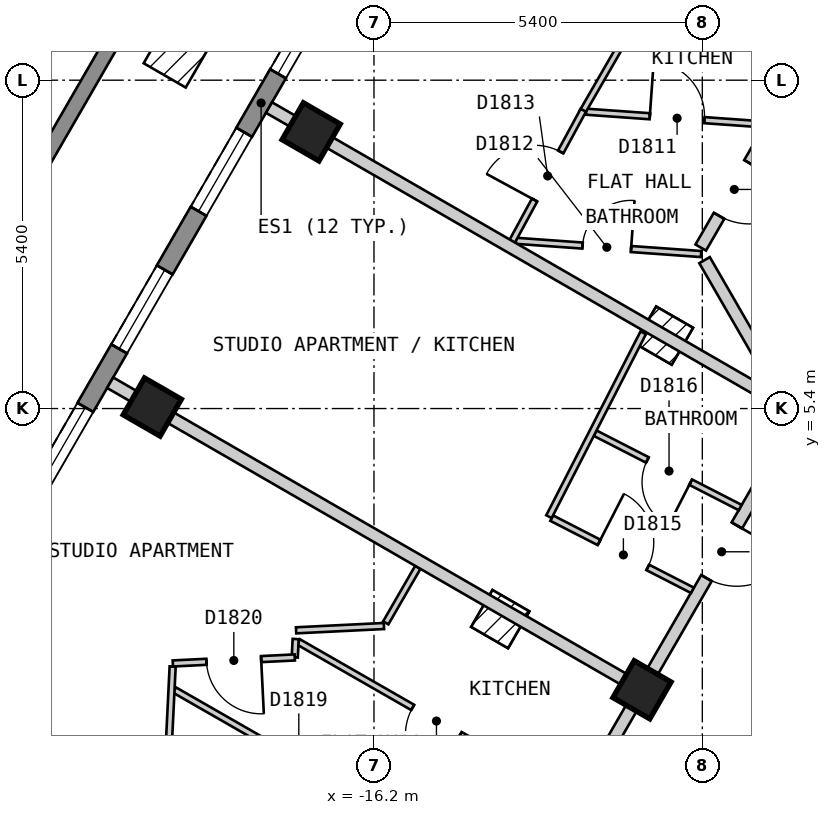
"""IFC4 building model, lengths in metres.
Left out: names, types, materials, properties, quantities, classifications, styles, units other than length and angle.
Written with IfcOpenShell. Run it as: python <this file> out.ifc"""

import sys

from ifc_helpers import new_model, si_unit, direction, frame, frame_2d, origin, origin_2d, place, context, subcontext, project, spatial, polyline, rectangle, outline, extrude, element, fill, save


model = new_model("IFC4")
c1 = context("Model", 3, precision=1e-05, world=origin(), true_north=direction((0.0, 1.0)))
c2 = subcontext(c1, "Body", "Model", "MODEL_VIEW")
j1 = project(units=[si_unit("LENGTHUNIT", "METRE"), si_unit("PLANEANGLEUNIT", "RADIAN")], contexts=[c1])
p1 = place(None, origin())
s1 = spatial("IfcSite", under=j1, at=p1, CompositionType="ELEMENT")
p2 = place(p1, origin())
s2 = spatial("IfcBuilding", under=s1, at=p2, CompositionType="ELEMENT")
p3 = place(p2, frame((0.0, 0.0, 202.8)))
s3 = spatial("IfcBuildingStorey", under=s2, at=p3, CompositionType="ELEMENT", Elevation=202.8)
for number, where, z_axis, x_axis in (
    (1, (-17.233, 9.95, 0.0), (0.0, 0.0, 1.0), (-0.5, -0.866, 0.0)),
    (2, (-19.846, 5.425, 0.0), (0.0, 0.0, 1.0), (-0.5, -0.866, 0.0)),
    (3, (-11.792, 0.775, 0.0), (0.0, 0.0, 1.0), (-0.5, -0.866, 0.0)),
):
    element("IfcColumn", number, at=place(p3, frame(where, z_axis=z_axis, x_axis=x_axis)), inside=s3, PredefinedType="COLUMN", context=c2, shape_type="SweptSolid", body=[
        extrude(rectangle(XDim=0.7, YDim=0.7, at=origin_2d()), origin(), (0.0, 0.0, 1.0), 3.0),
    ])
p4 = place(p3, frame((-12.514, 20.025, 0.0), z_axis=(0.0, 0.0, 1.0), x_axis=(-0.500003656944, -0.866023292436, 0.0)))
e4 = element("IfcWall", 4, at=p4, inside=s3, PredefinedType="SOLIDWALL", context=c2, shape_type="SweptSolid", body=[
    extrude(outline(polyline([(0.0, -0.15), (22.17, -0.15), (22.09, 0.15), (0.08, 0.15), (0.0, -0.15)])), origin(), (0.0, 0.0, 1.0), 2.7),
])
p5 = place(p4, frame((1.191, 0.0, 0.15)))
e5 = element("IfcOpeningElement", 5, at=p5, cuts=e4, PredefinedType="OPENING", context=c2, shape_type="SweptSolid", body=[
    extrude(rectangle(XDim=1.5, YDim=2.1, at=frame_2d((0.75, 1.05))), frame((0.0, 0.16, 0.0), z_axis=(0.0, -1.0, 0.0), x_axis=(1.0, 0.0, 0.0)), (0.0, 0.0, 1.0), 0.32),
])
p6 = place(p4, frame((3.804, 0.0, 0.15)))
e6 = element("IfcOpeningElement", 6, at=p6, cuts=e4, PredefinedType="OPENING", context=c2, shape_type="SweptSolid", body=[
    extrude(rectangle(XDim=1.5, YDim=2.1, at=frame_2d((0.75, 1.05))), frame((0.0, 0.16, 0.0), z_axis=(0.0, -1.0, 0.0), x_axis=(1.0, 0.0, 0.0)), (0.0, 0.0, 1.0), 0.32),
])
p7 = place(p4, frame((6.416, 0.0, 0.15)))
e7 = element("IfcOpeningElement", 7, at=p7, cuts=e4, PredefinedType="OPENING", context=c2, shape_type="SweptSolid", body=[
    extrude(rectangle(XDim=1.5, YDim=2.1, at=frame_2d((0.75, 1.05))), frame((0.0, 0.16, 0.0), z_axis=(0.0, -1.0, 0.0), x_axis=(1.0, 0.0, 0.0)), (0.0, 0.0, 1.0), 0.32),
])
p8 = place(p4, frame((9.029, 0.0, 0.15)))
e8 = element("IfcOpeningElement", 8, at=p8, cuts=e4, PredefinedType="OPENING", context=c2, shape_type="SweptSolid", body=[
    extrude(rectangle(XDim=1.5, YDim=2.1, at=frame_2d((0.75, 1.05))), frame((0.0, 0.16, 0.0), z_axis=(0.0, -1.0, 0.0), x_axis=(1.0, 0.0, 0.0)), (0.0, 0.0, 1.0), 0.32),
])
p9 = place(p4, frame((11.641, 0.0, 0.15)))
e9 = element("IfcOpeningElement", 9, at=p9, cuts=e4, PredefinedType="OPENING", context=c2, shape_type="SweptSolid", body=[
    extrude(rectangle(XDim=1.5, YDim=2.1, at=frame_2d((0.75, 1.05))), frame((0.0, 0.16, 0.0), z_axis=(0.0, -1.0, 0.0), x_axis=(1.0, 0.0, 0.0)), (0.0, 0.0, 1.0), 0.32),
])
p10 = place(p4, frame((14.254, 0.0, 0.15)))
e10 = element("IfcOpeningElement", 10, at=p10, cuts=e4, PredefinedType="OPENING", context=c2, shape_type="SweptSolid", body=[
    extrude(rectangle(XDim=1.5, YDim=2.1, at=frame_2d((0.75, 1.05))), frame((0.0, 0.16, 0.0), z_axis=(0.0, -1.0, 0.0), x_axis=(1.0, 0.0, 0.0)), (0.0, 0.0, 1.0), 0.32),
])
p11 = place(p4, frame((16.866, 0.0, 0.15)))
e11 = element("IfcOpeningElement", 11, at=p11, cuts=e4, PredefinedType="OPENING", context=c2, shape_type="SweptSolid", body=[
    extrude(rectangle(XDim=1.5, YDim=2.1, at=frame_2d((0.75, 1.05))), frame((0.0, 0.16, 0.0), z_axis=(0.0, -1.0, 0.0), x_axis=(1.0, 0.0, 0.0)), (0.0, 0.0, 1.0), 0.32),
])
p12 = place(p4, frame((19.479, 0.0, 0.15)))
e12 = element("IfcOpeningElement", 12, at=p12, cuts=e4, PredefinedType="OPENING", context=c2, shape_type="SweptSolid", body=[
    extrude(rectangle(XDim=1.5, YDim=2.1, at=frame_2d((0.75, 1.05))), frame((0.0, 0.16, 0.0), z_axis=(0.0, -1.0, 0.0), x_axis=(1.0, 0.0, 0.0)), (0.0, 0.0, 1.0), 0.32),
])
p13 = place(p3, frame((-26.046, 1.838, 0.0), z_axis=(0.0, 0.0, 1.0), x_axis=(0.500061067893, 0.865990143349, 0.0)))
e13 = element("IfcWall", 13, at=p13, inside=s3, PredefinedType="PARAPET", context=c2, shape_type="SweptSolid", body=[
    extrude(outline(polyline([(0.067, -0.125), (22.796, -0.125), (22.863, 0.125), (0.0, 0.125), (0.067, -0.125)])), origin(), (0.0, 0.0, 1.0), 1.6),
])
p14 = place(p3, frame((-10.763, 7.841, 0.0), z_axis=(0.0, 0.0, 1.0), x_axis=(0.499980792466, -0.866036492975, 0.0)))
e14 = element("IfcWall", 14, at=p14, inside=s3, PredefinedType="PARTITIONING", context=c2, shape_type="SweptSolid", body=[
    extrude(rectangle(XDim=2.618, YDim=0.2, at=frame_2d((1.309, 0.0))), origin(), (0.0, 0.0, 1.0), 2.7),
])
p15 = place(p3, frame((-10.623, -1.6, 0.0), z_axis=(0.0, 0.0, 1.0), x_axis=(0.500040865889, 0.866001808567, 0.0)))
e15 = element("IfcWall", 15, at=p15, inside=s3, PredefinedType="PARTITIONING", context=c2, shape_type="SweptSolid", body=[
    extrude(rectangle(XDim=5.31, YDim=0.2, at=frame_2d((2.655, 0.0))), origin(), (0.0, 0.0, 1.0), 2.7),
])
p16 = place(p15, frame((2.205, 0.0, 0.0)))
e16 = element("IfcOpeningElement", 16, at=p16, cuts=e15, PredefinedType="OPENING", context=c2, shape_type="SweptSolid", body=[
    extrude(rectangle(XDim=0.9, YDim=2.1, at=frame_2d((0.45, 1.05))), frame((0.0, 0.11, 0.0), z_axis=(0.0, -1.0, 0.0), x_axis=(1.0, 0.0, 0.0)), (0.0, 0.0, 1.0), 0.22),
])
p17 = place(p3, frame((-13.106, -1.5, 0.0), z_axis=(0.0, 0.0, 1.0), x_axis=(0.500025705601, 0.86601056214, 0.0)))
e17 = element("IfcWall", 17, at=p17, inside=s3, PredefinedType="PARTITIONING", context=c2, shape_type="SweptSolid", body=[
    extrude(rectangle(XDim=7.735, YDim=0.2, at=frame_2d((3.868, 0.0))), origin(), (0.0, 0.0, 1.0), 2.7),
])
p18 = place(p17, frame((4.748, 0.0, 0.0)))
e18 = element("IfcOpeningElement", 18, at=p18, cuts=e17, PredefinedType="OPENING", context=c2, shape_type="SweptSolid", body=[
    extrude(rectangle(XDim=1.0, YDim=2.1, at=frame_2d((0.5, 1.05))), frame((0.0, 0.11, 0.0), z_axis=(0.0, -1.0, 0.0), x_axis=(1.0, 0.0, 0.0)), (0.0, 0.0, 1.0), 0.22),
])
p19 = place(p17, frame((0.03, 0.0, 0.0)))
e19 = element("IfcOpeningElement", 19, at=p19, cuts=e17, PredefinedType="OPENING", context=c2, shape_type="SweptSolid", body=[
    extrude(rectangle(XDim=0.8, YDim=2.1, at=frame_2d((0.4, 1.05))), frame((0.0, 0.11, 0.0), z_axis=(0.0, -1.0, 0.0), x_axis=(1.0, 0.0, 0.0)), (0.0, 0.0, 1.0), 0.22),
])
p20 = place(p3, frame((-10.826, 8.048, 0.0), z_axis=(0.0, 0.0, 1.0), x_axis=(0.499953104851, 0.866052477019, 0.0)))
e20 = element("IfcWall", 20, at=p20, inside=s3, PredefinedType="PARTITIONING", context=c2, shape_type="SweptSolid", body=[
    extrude(rectangle(XDim=7.91, YDim=0.2, at=frame_2d((3.955, 0.0))), origin(), (0.0, 0.0, 1.0), 2.7),
])
p21 = place(p20, frame((0.603, 0.0, 0.0)))
e21 = element("IfcOpeningElement", 21, at=p21, cuts=e20, PredefinedType="OPENING", context=c2, shape_type="SweptSolid", body=[
    extrude(rectangle(XDim=1.0, YDim=2.1, at=frame_2d((0.5, 1.05))), frame((0.0, 0.11, 0.0), z_axis=(0.0, -1.0, 0.0), x_axis=(1.0, 0.0, 0.0)), (0.0, 0.0, 1.0), 0.22),
])
p22 = place(p3, frame((-12.562, 4.995, 0.0), z_axis=(0.0, 0.0, 1.0), x_axis=(0.889807979554, -0.456335139478, 0.0)))
e22 = element("IfcWall", 22, at=p22, inside=s3, PredefinedType="PARTITIONING", context=c2, shape_type="SweptSolid", body=[
    extrude(rectangle(XDim=2.68, YDim=0.1, at=frame_2d((1.34, 0.0))), origin(), (0.0, 0.0, 1.0), 2.7),
])
p23 = place(p22, frame((0.965, 0.0, 0.0)))
e23 = element("IfcOpeningElement", 23, at=p23, cuts=e22, PredefinedType="OPENING", context=c2, shape_type="SweptSolid", body=[
    extrude(rectangle(XDim=0.8, YDim=2.1, at=frame_2d((0.4, 1.05))), frame((0.0, 0.06, 0.0), z_axis=(0.0, -1.0, 0.0), x_axis=(1.0, 0.0, 0.0)), (0.0, 0.0, 1.0), 0.12),
])
p24 = place(p3, frame((-13.277, 3.598, 0.0), z_axis=(0.0, 0.0, 1.0), x_axis=(0.889780322893, -0.456389063182, 0.0)))
e24 = element("IfcWall", 24, at=p24, inside=s3, PredefinedType="PARTITIONING", context=c2, shape_type="SweptSolid", body=[
    extrude(rectangle(XDim=2.601, YDim=0.1, at=frame_2d((1.3, 0.0))), origin(), (0.0, 0.0, 1.0), 2.7),
])
p25 = place(p24, frame((0.875, 0.0, 0.0)))
e25 = element("IfcOpeningElement", 25, at=p25, cuts=e24, PredefinedType="OPENING", context=c2, shape_type="SweptSolid", body=[
    extrude(rectangle(XDim=0.9, YDim=2.1, at=frame_2d((0.45, 1.05))), frame((0.0, 0.06, 0.0), z_axis=(0.0, -1.0, 0.0), x_axis=(1.0, 0.0, 0.0)), (0.0, 0.0, 1.0), 0.12),
])
p26 = place(p3, frame((-17.441, 1.562, 0.0), z_axis=(0.0, 0.0, 1.0), x_axis=(0.867419073464, -0.497578286293, 0.0)))
e26 = element("IfcWall", 26, at=p26, inside=s3, PredefinedType="PARTITIONING", context=c2, shape_type="SweptSolid", body=[
    extrude(rectangle(XDim=5.185, YDim=0.1, at=frame_2d((2.593, 0.0))), origin(), (0.0, 0.0, 1.0), 2.7),
])
p27 = place(p26, frame((2.165, 0.0, 0.0)))
e27 = element("IfcOpeningElement", 27, at=p27, cuts=e26, PredefinedType="OPENING", context=c2, shape_type="SweptSolid", body=[
    extrude(rectangle(XDim=0.9, YDim=2.1, at=frame_2d((0.45, 1.05))), frame((0.0, 0.06, 0.0), z_axis=(0.0, -1.0, 0.0), x_axis=(1.0, 0.0, 0.0)), (0.0, 0.0, 1.0), 0.12),
])
p28 = place(p3, frame((-19.48, 0.771, 0.0), z_axis=(0.0, 0.0, 1.0), x_axis=(0.86748552317, -0.497462427817, 0.0)))
e28 = element("IfcWall", 28, at=p28, inside=s3, PredefinedType="PARTITIONING", context=c2, shape_type="SweptSolid", body=[
    extrude(rectangle(XDim=4.567, YDim=0.1, at=frame_2d((2.284, 0.0))), origin(), (0.0, 0.0, 1.0), 2.7),
])
p29 = place(p28, frame((1.956, 0.0, 0.0)))
e29 = element("IfcOpeningElement", 29, at=p29, cuts=e28, PredefinedType="OPENING", context=c2, shape_type="SweptSolid", body=[
    extrude(rectangle(XDim=0.8, YDim=2.1, at=frame_2d((0.4, 1.05))), frame((0.0, 0.06, 0.0), z_axis=(0.0, -1.0, 0.0), x_axis=(1.0, 0.0, 0.0)), (0.0, 0.0, 1.0), 0.12),
])
p30 = place(p3, frame((-13.866, 8.159, 0.0), z_axis=(0.0, 0.0, 1.0), x_axis=(0.9974481372, -0.071394772886, 0.0)))
e30 = element("IfcWall", 30, at=p30, inside=s3, PredefinedType="PARTITIONING", context=c2, shape_type="SweptSolid", body=[
    extrude(rectangle(XDim=3.054, YDim=0.1, at=frame_2d((1.527, 0.0))), origin(), (0.0, 0.0, 1.0), 2.7),
])
p31 = place(p30, frame((1.099, 0.0, 0.0)))
e31 = element("IfcOpeningElement", 31, at=p31, cuts=e30, PredefinedType="OPENING", context=c2, shape_type="SweptSolid", body=[
    extrude(rectangle(XDim=0.8, YDim=2.1, at=frame_2d((0.4, 1.05))), frame((0.0, 0.06, 0.0), z_axis=(0.0, -1.0, 0.0), x_axis=(1.0, 0.0, 0.0)), (0.0, 0.0, 1.0), 0.12),
])
p32 = place(p3, frame((-12.712, 10.282, 0.0), z_axis=(0.0, 0.0, 1.0), x_axis=(0.997457858552, -0.071258826911, 0.0)))
e32 = element("IfcWall", 32, at=p32, inside=s3, PredefinedType="PARTITIONING", context=c2, shape_type="SweptSolid", body=[
    extrude(rectangle(XDim=2.947, YDim=0.1, at=frame_2d((1.473, 0.0))), origin(), (0.0, 0.0, 1.0), 2.7),
])
p33 = place(p32, frame((1.051, 0.0, 0.0)))
e33 = element("IfcOpeningElement", 33, at=p33, cuts=e32, PredefinedType="OPENING", context=c2, shape_type="SweptSolid", body=[
    extrude(rectangle(XDim=0.9, YDim=2.1, at=frame_2d((0.45, 1.05))), frame((0.0, 0.06, 0.0), z_axis=(0.0, -1.0, 0.0), x_axis=(1.0, 0.0, 0.0)), (0.0, 0.0, 1.0), 0.12),
])
p34 = place(p3, frame((-16.006, 1.876, 0.0), z_axis=(0.0, 0.0, 1.0), x_axis=(0.499949632511, 0.866054481515, 0.0)))
e34 = element("IfcWall", 34, at=p34, inside=s3, PredefinedType="PARTITIONING", context=c2, shape_type="SweptSolid", body=[
    extrude(rectangle(XDim=1.054, YDim=0.1, at=frame_2d((0.527, 0.0))), origin(), (0.0, 0.0, 1.0), 2.7),
])
p35 = place(p3, frame((-12.778, 10.268, 0.0), z_axis=(0.0, 0.0, 1.0), x_axis=(0.500084799062, 0.865976439487, 0.0)))
e35 = element("IfcWall", 35, at=p35, inside=s3, PredefinedType="PARTITIONING", context=c2, shape_type="SweptSolid", body=[
    extrude(rectangle(XDim=2.722, YDim=0.1, at=frame_2d((1.361, 0.0))), origin(), (0.0, 0.0, 1.0), 2.7),
])
p36 = place(p3, frame((-13.93, 8.145, 0.0), z_axis=(0.0, 0.0, 1.0), x_axis=(0.477194887681, 0.878797496111, 0.0)))
e36 = element("IfcWall", 36, at=p36, inside=s3, PredefinedType="PARTITIONING", context=c2, shape_type="SweptSolid", body=[
    extrude(rectangle(XDim=2.458, YDim=0.1, at=frame_2d((1.229, 0.0))), origin(), (0.0, 0.0, 1.0), 2.7),
])
p37 = place(p36, frame((0.779, 0.0, 0.0)))
e37 = element("IfcOpeningElement", 37, at=p37, cuts=e36, PredefinedType="OPENING", context=c2, shape_type="SweptSolid", body=[
    extrude(rectangle(XDim=0.9, YDim=2.1, at=frame_2d((0.45, 1.05))), frame((0.0, 0.06, 0.0), z_axis=(0.0, -1.0, 0.0), x_axis=(1.0, 0.0, 0.0)), (0.0, 0.0, 1.0), 0.12),
])
p38 = place(p3, frame((-13.322, 3.622, 0.0), z_axis=(0.0, 0.0, 1.0), x_axis=(0.456157649007, 0.889898982611, 0.0)))
e38 = element("IfcWall", 38, at=p38, inside=s3, PredefinedType="PARTITIONING", context=c2, shape_type="SweptSolid", body=[
    extrude(rectangle(XDim=3.398, YDim=0.1, at=frame_2d((1.699, 0.0))), origin(), (0.0, 0.0, 1.0), 2.7),
])
p39 = place(p3, frame((-17.503, 1.307, 0.0), z_axis=(0.0, 0.0, 1.0), x_axis=(0.049055201451, 0.99879606888, 0.0)))
e39 = element("IfcWall", 39, at=p39, inside=s3, PredefinedType="PARTITIONING", context=c2, shape_type="SweptSolid", body=[
    extrude(rectangle(XDim=0.303, YDim=0.1, at=frame_2d((0.152, 0.0))), origin(), (0.0, 0.0, 1.0), 2.7),
])
p40 = place(p3, frame((-19.641, -1.5, 0.0), z_axis=(0.0, 0.0, 1.0), x_axis=(0.048898906005, 0.998803732968, 0.0)))
e40 = element("IfcWall", 40, at=p40, inside=s3, PredefinedType="PARTITIONING", context=c2, shape_type="SweptSolid", body=[
    extrude(rectangle(XDim=2.661, YDim=0.1, at=frame_2d((1.331, 0.0))), origin(), (0.0, 0.0, 1.0), 2.7),
])
p41 = place(p3, frame((-19.508, 1.208, 0.0), z_axis=(0.0, 0.0, 1.0), x_axis=(0.998786372978, 0.04925221978, 0.0)))
e41 = element("IfcWall", 41, at=p41, inside=s3, PredefinedType="PARTITIONING", context=c2, shape_type="SweptSolid", body=[
    extrude(rectangle(XDim=2.008, YDim=0.1, at=frame_2d((1.004, 0.0))), origin(), (0.0, 0.0, 1.0), 2.7),
])
p42 = place(p41, frame((0.554, 0.0, 0.0)))
e42 = element("IfcOpeningElement", 42, at=p42, cuts=e41, PredefinedType="OPENING", context=c2, shape_type="SweptSolid", body=[
    extrude(rectangle(XDim=0.9, YDim=2.1, at=frame_2d((0.45, 1.05))), frame((0.0, 0.06, 0.0), z_axis=(0.0, -1.0, 0.0), x_axis=(1.0, 0.0, 0.0)), (0.0, 0.0, 1.0), 0.12),
])
p43 = place(p3, frame((-17.481, 1.753, 0.0), z_axis=(0.0, 0.0, 1.0), x_axis=(0.998793651238, 0.049104401505, 0.0)))
e43 = element("IfcWall", 43, at=p43, inside=s3, PredefinedType="PARTITIONING", context=c2, shape_type="SweptSolid", body=[
    extrude(rectangle(XDim=1.447, YDim=0.1, at=frame_2d((0.723, 0.0))), origin(), (0.0, 0.0, 1.0), 2.7),
])
p44 = place(p3, frame((-20.539, 5.825, 0.0), z_axis=(0.0, 0.0, 1.0), x_axis=(0.866028187226, -0.499995178908, 0.0)))
e44 = element("IfcWall", 44, at=p44, inside=s3, PredefinedType="PARTITIONING", context=c2, shape_type="SweptSolid", body=[
    extrude(rectangle(XDim=9.996, YDim=0.2, at=frame_2d((4.998, 0.0))), origin(), (0.0, 0.0, 1.0), 2.7),
])
p45 = place(p3, frame((-17.926, 10.35, 0.0), z_axis=(0.0, 0.0, 1.0), x_axis=(0.866018411306, -0.500012111133, 0.0)))
e45 = element("IfcWall", 45, at=p45, inside=s3, PredefinedType="PARTITIONING", context=c2, shape_type="SweptSolid", body=[
    extrude(rectangle(XDim=9.898, YDim=0.2, at=frame_2d((4.949, 0.0))), origin(), (0.0, 0.0, 1.0), 2.7),
])
p46 = place(p3, frame((-15.314, 14.875, 0.0), z_axis=(0.0, 0.0, 1.0), x_axis=(0.866001485781, -0.500041424909, 0.0)))
e46 = element("IfcWall", 46, at=p46, inside=s3, PredefinedType="PARTITIONING", context=c2, shape_type="SweptSolid", body=[
    extrude(rectangle(XDim=7.2, YDim=0.2, at=frame_2d((3.6, 0.0))), origin(), (0.0, 0.0, 1.0), 2.7),
])
p47 = place(p8, origin())
e47 = element("IfcWindow", 47, at=p47, inside=s3, PartitioningType="SINGLE_PANEL", PredefinedType="WINDOW", context=c2, shape_type="SweptSolid", body=[
    extrude(rectangle(XDim=1.5, YDim=2.1, at=frame_2d((0.75, 1.05))), frame((0.0, 0.03, 0.0), z_axis=(0.0, -1.0, 0.0), x_axis=(1.0, 0.0, 0.0)), (0.0, 0.0, 1.0), 0.06),
])
fill(e8, e47)
p48 = place(p9, origin())
e48 = element("IfcWindow", 48, at=p48, inside=s3, PartitioningType="SINGLE_PANEL", PredefinedType="WINDOW", context=c2, shape_type="SweptSolid", body=[
    extrude(rectangle(XDim=1.5, YDim=2.1, at=frame_2d((0.75, 1.05))), frame((0.0, 0.03, 0.0), z_axis=(0.0, -1.0, 0.0), x_axis=(1.0, 0.0, 0.0)), (0.0, 0.0, 1.0), 0.06),
])
fill(e9, e48)
p49 = place(p10, origin())
e49 = element("IfcWindow", 49, at=p49, inside=s3, PartitioningType="SINGLE_PANEL", PredefinedType="WINDOW", context=c2, shape_type="SweptSolid", body=[
    extrude(rectangle(XDim=1.5, YDim=2.1, at=frame_2d((0.75, 1.05))), frame((0.0, 0.03, 0.0), z_axis=(0.0, -1.0, 0.0), x_axis=(1.0, 0.0, 0.0)), (0.0, 0.0, 1.0), 0.06),
])
fill(e10, e49)
p50 = place(p11, origin())
e50 = element("IfcWindow", 50, at=p50, inside=s3, PartitioningType="SINGLE_PANEL", PredefinedType="WINDOW", context=c2, shape_type="SweptSolid", body=[
    extrude(rectangle(XDim=1.5, YDim=2.1, at=frame_2d((0.75, 1.05))), frame((0.0, 0.03, 0.0), z_axis=(0.0, -1.0, 0.0), x_axis=(1.0, 0.0, 0.0)), (0.0, 0.0, 1.0), 0.06),
])
fill(e11, e50)
p51 = place(p21, origin())
e51 = element("IfcDoor", 51, at=p51, inside=s3, OperationType="SINGLE_SWING_RIGHT", PredefinedType="DOOR", context=c2, shape_type="SweptSolid", body=[
    extrude(rectangle(XDim=1.0, YDim=2.1, at=frame_2d((0.5, 1.05))), frame((0.0, 0.025, 0.0), z_axis=(0.0, -1.0, 0.0), x_axis=(1.0, 0.0, 0.0)), (0.0, 0.0, 1.0), 0.05),
])
fill(e21, e51)
p52 = place(p33, origin())
e52 = element("IfcDoor", 52, at=p52, inside=s3, OperationType="SINGLE_SWING_LEFT", PredefinedType="DOOR", context=c2, shape_type="SweptSolid", body=[
    extrude(rectangle(XDim=0.9, YDim=2.1, at=frame_2d((0.45, 1.05))), frame((0.0, 0.025, 0.0), z_axis=(0.0, -1.0, 0.0), x_axis=(1.0, 0.0, 0.0)), (0.0, 0.0, 1.0), 0.05),
])
fill(e33, e52)
p53 = place(p31, origin())
e53 = element("IfcDoor", 53, at=p53, inside=s3, OperationType="SINGLE_SWING_RIGHT", PredefinedType="DOOR", context=c2, shape_type="SweptSolid", body=[
    extrude(rectangle(XDim=0.8, YDim=2.1, at=frame_2d((0.4, 1.05))), frame((0.0, 0.025, 0.0), z_axis=(0.0, -1.0, 0.0), x_axis=(1.0, 0.0, 0.0)), (0.0, 0.0, 1.0), 0.05),
])
fill(e31, e53)
p54 = place(p37, origin())
e54 = element("IfcDoor", 54, at=p54, inside=s3, OperationType="SINGLE_SWING_LEFT", PredefinedType="DOOR", context=c2, shape_type="SweptSolid", body=[
    extrude(rectangle(XDim=0.9, YDim=2.1, at=frame_2d((0.45, 1.05))), frame((0.0, 0.025, 0.0), z_axis=(0.0, -1.0, 0.0), x_axis=(1.0, 0.0, 0.0)), (0.0, 0.0, 1.0), 0.05),
])
fill(e37, e54)
p55 = place(p18, origin())
e55 = element("IfcDoor", 55, at=p55, inside=s3, OperationType="SINGLE_SWING_RIGHT", PredefinedType="DOOR", context=c2, shape_type="SweptSolid", body=[
    extrude(rectangle(XDim=1.0, YDim=2.1, at=frame_2d((0.5, 1.05))), frame((0.0, 0.025, 0.0), z_axis=(0.0, -1.0, 0.0), x_axis=(1.0, 0.0, 0.0)), (0.0, 0.0, 1.0), 0.05),
])
fill(e18, e55)
p56 = place(p25, origin())
e56 = element("IfcDoor", 56, at=p56, inside=s3, OperationType="SINGLE_SWING_LEFT", PredefinedType="DOOR", context=c2, shape_type="SweptSolid", body=[
    extrude(rectangle(XDim=0.9, YDim=2.1, at=frame_2d((0.45, 1.05))), frame((0.0, 0.025, 0.0), z_axis=(0.0, -1.0, 0.0), x_axis=(1.0, 0.0, 0.0)), (0.0, 0.0, 1.0), 0.05),
])
fill(e25, e56)
p57 = place(p23, origin())
e57 = element("IfcDoor", 57, at=p57, inside=s3, OperationType="SINGLE_SWING_RIGHT", PredefinedType="DOOR", context=c2, shape_type="SweptSolid", body=[
    extrude(rectangle(XDim=0.8, YDim=2.1, at=frame_2d((0.4, 1.05))), frame((0.0, 0.025, 0.0), z_axis=(0.0, -1.0, 0.0), x_axis=(1.0, 0.0, 0.0)), (0.0, 0.0, 1.0), 0.05),
])
fill(e23, e57)
p58 = place(p27, origin())
e58 = element("IfcDoor", 58, at=p58, inside=s3, OperationType="SINGLE_SWING_RIGHT", PredefinedType="DOOR", context=c2, shape_type="SweptSolid", body=[
    extrude(rectangle(XDim=0.9, YDim=2.1, at=frame_2d((0.45, 1.05))), frame((0.0, 0.025, 0.0), z_axis=(0.0, -1.0, 0.0), x_axis=(1.0, 0.0, 0.0)), (0.0, 0.0, 1.0), 0.05),
])
fill(e27, e58)
p59 = place(p42, origin())
e59 = element("IfcDoor", 59, at=p59, inside=s3, OperationType="SINGLE_SWING_RIGHT", PredefinedType="DOOR", context=c2, shape_type="SweptSolid", body=[
    extrude(rectangle(XDim=0.9, YDim=2.1, at=frame_2d((0.45, 1.05))), frame((0.0, 0.025, 0.0), z_axis=(0.0, -1.0, 0.0), x_axis=(1.0, 0.0, 0.0)), (0.0, 0.0, 1.0), 0.05),
])
fill(e42, e59)
save(model, sys.argv[1])
